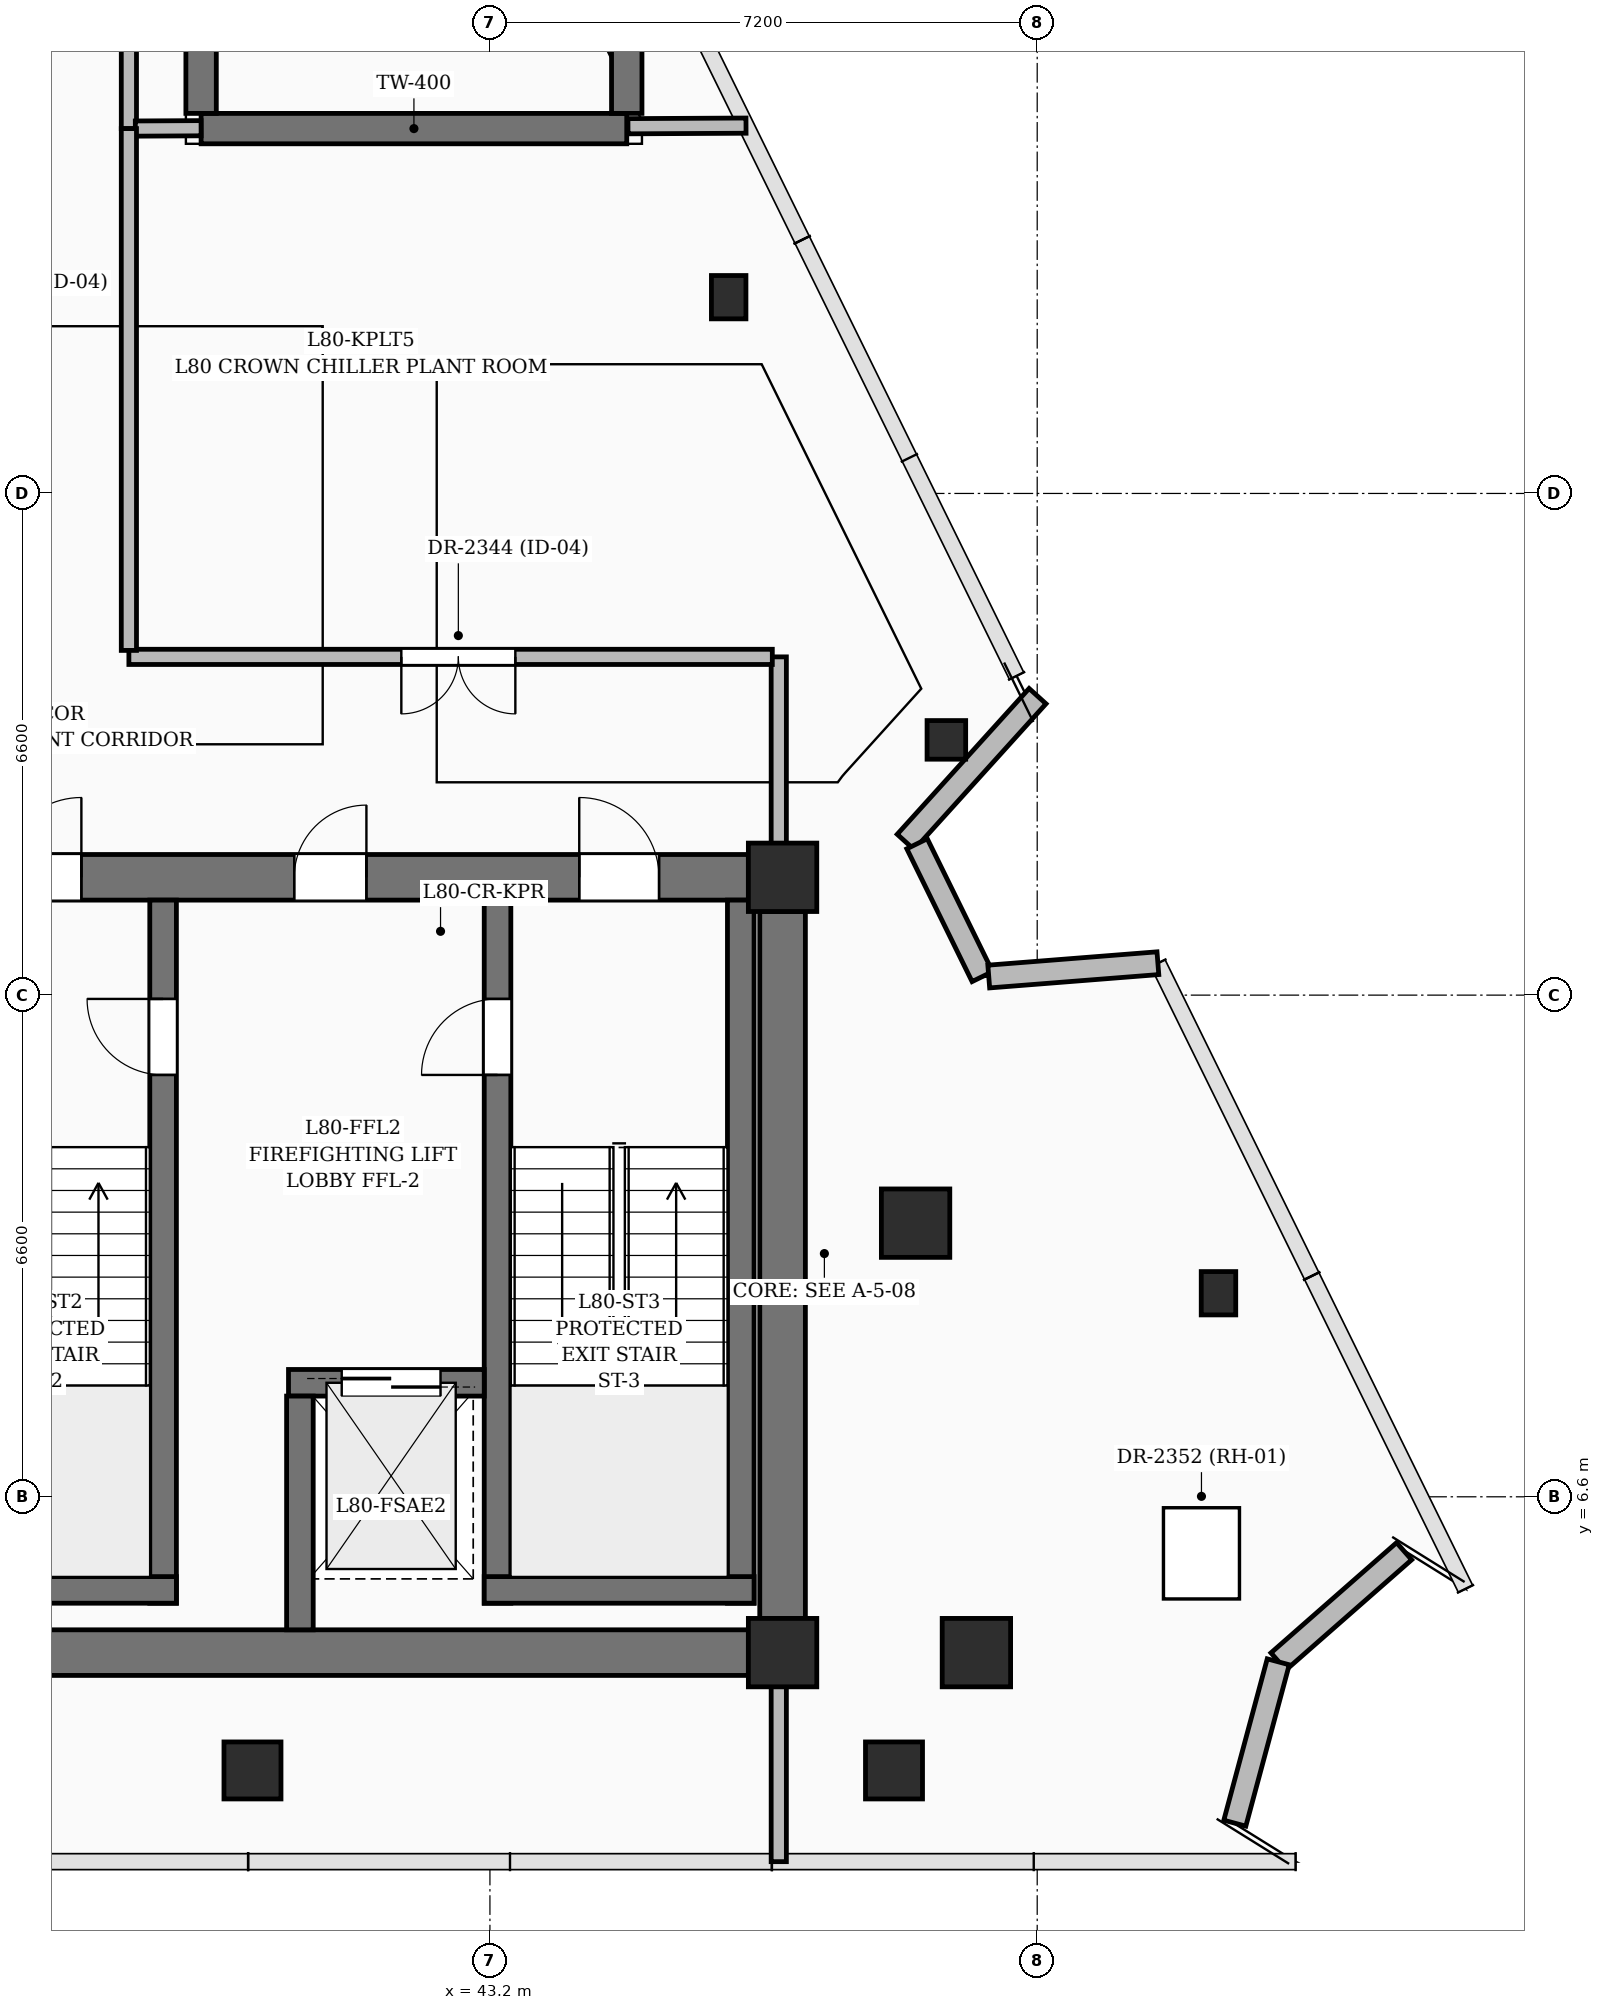
"""IFC4 building model, lengths in metres.
Left out: names, types, materials, properties, quantities, classifications, styles, units other than length and angle.
Written with IfcOpenShell. Run it as: python <this file> out.ifc"""

import sys

from ifc_helpers import new_model, si_unit, direction, frame, frame_2d, origin, origin_2d, place, context, subcontext, project, spatial, rectangle, hollow_circle, i_section, extrude, element, fill, save


model = new_model("IFC4")
c1 = context("Model", 3, precision=1e-05, world=origin(), true_north=direction((0.0, 1.0)))
c2 = subcontext(c1, "Body", "Model", "MODEL_VIEW")
j1 = project(units=[si_unit("LENGTHUNIT", "METRE"), si_unit("PLANEANGLEUNIT", "RADIAN")], contexts=[c1])
p1 = place(None, origin())
s1 = spatial("IfcSite", under=j1, at=p1, CompositionType="ELEMENT")
p2 = place(p1, origin())
s2 = spatial("IfcBuilding", under=s1, at=p2, CompositionType="ELEMENT")
p3 = place(p2, frame((0.0, 0.0, 310.5)))
s3 = spatial("IfcBuildingStorey", under=s2, at=p3, CompositionType="ELEMENT", Elevation=310.5)
for number, where, z_axis, x_axis in (
    (1, (47.05, 4.55, 0.0), (0.0, 0.0, 1.0), (1.0, 0.0, 0.0)),
    (2, (47.05, 14.75, 0.0), (0.0, 0.0, 1.0), (1.0, 0.0, 0.0)),
    (3, (49.6, 4.55, 0.0), (0.0, 0.0, 1.0), (1.0, 0.0, 0.0)),
    (4, (48.8, 10.2, 0.0), (0.0, 0.0, 1.0), (1.0, 0.0, 0.0)),
):
    element("IfcColumn", number, at=place(p3, frame(where, z_axis=z_axis, x_axis=x_axis)), inside=s3, PredefinedType="COLUMN", context=c2, shape_type="SweptSolid", body=[
        extrude(rectangle(XDim=0.9, YDim=0.9, at=origin_2d()), origin(), (0.0, 0.0, 1.0), 4.0),
    ])
p4 = place(p3, frame((35.6, 4.55, 0.0), z_axis=(0.0, 0.0, 1.0), x_axis=(1.0, 0.0, 0.0)))
e5 = element("IfcWall", 5, at=p4, inside=s3, PredefinedType="SHEAR", context=c2, shape_type="SweptSolid", body=[
    extrude(rectangle(XDim=11.0, YDim=0.6, at=frame_2d((5.5, 0.0))), origin(), (0.0, 0.0, 1.0), 4.0),
])
p5 = place(p3, frame((35.6, 14.75, 0.0), z_axis=(0.0, 0.0, 1.0), x_axis=(1.0, 0.0, 0.0)))
e6 = element("IfcWall", 6, at=p5, inside=s3, PredefinedType="SHEAR", context=c2, shape_type="SweptSolid", body=[
    extrude(rectangle(XDim=11.0, YDim=0.6, at=frame_2d((5.5, 0.0))), origin(), (0.0, 0.0, 1.0), 4.0),
])
p6 = place(p5, frame((1.175, 0.0, 0.0)))
e7 = element("IfcOpeningElement", 7, at=p6, cuts=e6, PredefinedType="OPENING", context=c2, shape_type="SweptSolid", body=[
    extrude(rectangle(XDim=1.05, YDim=2.15, at=frame_2d((0.525, 1.075))), frame((0.0, 0.31, 0.0), z_axis=(0.0, -1.0, 0.0), x_axis=(1.0, 0.0, 0.0)), (0.0, 0.0, 1.0), 0.62),
])
p7 = place(p5, frame((8.775, 0.0, 0.0)))
e8 = element("IfcOpeningElement", 8, at=p7, cuts=e6, PredefinedType="OPENING", context=c2, shape_type="SweptSolid", body=[
    extrude(rectangle(XDim=1.05, YDim=2.15, at=frame_2d((0.525, 1.075))), frame((0.0, 0.31, 0.0), z_axis=(0.0, -1.0, 0.0), x_axis=(1.0, 0.0, 0.0)), (0.0, 0.0, 1.0), 0.62),
])
p8 = place(p5, frame((5.025, 0.0, 0.0)))
e9 = element("IfcOpeningElement", 9, at=p8, cuts=e6, PredefinedType="OPENING", context=c2, shape_type="SweptSolid", body=[
    extrude(rectangle(XDim=0.95, YDim=2.15, at=frame_2d((0.475, 1.075))), frame((0.0, 0.31, 0.0), z_axis=(0.0, -1.0, 0.0), x_axis=(1.0, 0.0, 0.0)), (0.0, 0.0, 1.0), 0.62),
])
p9 = place(p3, frame((47.05, 5.0, 0.0), z_axis=(0.0, 0.0, 1.0), x_axis=(0.0, 1.0, 0.0)))
e10 = element("IfcWall", 10, at=p9, inside=s3, PredefinedType="SHEAR", context=c2, shape_type="SweptSolid", body=[
    extrude(rectangle(XDim=9.3, YDim=0.6, at=frame_2d((4.65, 0.0))), origin(), (0.0, 0.0, 1.0), 4.0),
])
p10 = place(p3, frame((38.9, 5.2, 0.0), z_axis=(0.0, 0.0, 1.0), x_axis=(0.0, 1.0, 0.0)))
e11 = element("IfcWall", 11, at=p10, inside=s3, PredefinedType="SOLIDWALL", context=c2, shape_type="SweptSolid", body=[
    extrude(rectangle(XDim=9.25, YDim=0.35, at=frame_2d((4.625, 0.0))), origin(), (0.0, 0.0, 1.0), 4.0),
])
p11 = place(p10, frame((6.95, 0.0, 0.0)))
e12 = element("IfcOpeningElement", 12, at=p11, cuts=e11, PredefinedType="OPENING", context=c2, shape_type="SweptSolid", body=[
    extrude(rectangle(XDim=1.0, YDim=2.15, at=frame_2d((0.5, 1.075))), frame((0.0, 0.185, 0.0), z_axis=(0.0, -1.0, 0.0), x_axis=(1.0, 0.0, 0.0)), (0.0, 0.0, 1.0), 0.37),
])
p12 = place(p3, frame((35.525, 5.375, 0.0), z_axis=(0.0, 0.0, 1.0), x_axis=(1.0, 0.0, 0.0)))
e13 = element("IfcWall", 13, at=p12, inside=s3, PredefinedType="SOLIDWALL", context=c2, shape_type="SweptSolid", body=[
    extrude(rectangle(XDim=3.55, YDim=0.35, at=frame_2d((1.775, 0.0))), origin(), (0.0, 0.0, 1.0), 4.0),
])
p13 = place(p3, frame((43.3, 5.2, 0.0), z_axis=(0.0, 0.0, 1.0), x_axis=(0.0, 1.0, 0.0)))
e14 = element("IfcWall", 14, at=p13, inside=s3, PredefinedType="SOLIDWALL", context=c2, shape_type="SweptSolid", body=[
    extrude(rectangle(XDim=9.25, YDim=0.35, at=frame_2d((4.625, 0.0))), origin(), (0.0, 0.0, 1.0), 4.0),
])
p14 = place(p13, frame((6.95, 0.0, 0.0)))
e15 = element("IfcOpeningElement", 15, at=p14, cuts=e14, PredefinedType="OPENING", context=c2, shape_type="SweptSolid", body=[
    extrude(rectangle(XDim=1.0, YDim=2.15, at=frame_2d((0.5, 1.075))), frame((0.0, 0.185, 0.0), z_axis=(0.0, -1.0, 0.0), x_axis=(1.0, 0.0, 0.0)), (0.0, 0.0, 1.0), 0.37),
])
p15 = place(p3, frame((46.5, 5.2, 0.0), z_axis=(0.0, 0.0, 1.0), x_axis=(0.0, 1.0, 0.0)))
e16 = element("IfcWall", 16, at=p15, inside=s3, PredefinedType="SOLIDWALL", context=c2, shape_type="SweptSolid", body=[
    extrude(rectangle(XDim=9.25, YDim=0.35, at=frame_2d((4.625, 0.0))), origin(), (0.0, 0.0, 1.0), 4.0),
])
p16 = place(p3, frame((43.125, 5.375, 0.0), z_axis=(0.0, 0.0, 1.0), x_axis=(1.0, 0.0, 0.0)))
e17 = element("IfcWall", 17, at=p16, inside=s3, PredefinedType="SOLIDWALL", context=c2, shape_type="SweptSolid", body=[
    extrude(rectangle(XDim=3.55, YDim=0.35, at=frame_2d((1.775, 0.0))), origin(), (0.0, 0.0, 1.0), 4.0),
])
p17 = place(p3, frame((40.55, 8.1, 0.0), z_axis=(0.0, 0.0, 1.0), x_axis=(1.0, 0.0, 0.0)))
e18 = element("IfcWall", 18, at=p17, inside=s3, PredefinedType="SOLIDWALL", context=c2, shape_type="SweptSolid", body=[
    extrude(rectangle(XDim=2.575, YDim=0.35, at=frame_2d((1.288, 0.0))), origin(), (0.0, 0.0, 1.0), 4.0),
])
p18 = place(p17, frame((0.7, 0.0, 0.0)))
e19 = element("IfcOpeningElement", 19, at=p18, cuts=e18, PredefinedType="OPENING", context=c2, shape_type="SweptSolid", body=[
    extrude(rectangle(XDim=1.3, YDim=2.25, at=frame_2d((0.65, 1.125))), frame((0.0, 0.185, 0.0), z_axis=(0.0, -1.0, 0.0), x_axis=(1.0, 0.0, 0.0)), (0.0, 0.0, 1.0), 0.37),
])
p19 = place(p3, frame((40.7, 4.85, 0.0), z_axis=(0.0, 0.0, 1.0), x_axis=(0.0, 1.0, 0.0)))
e20 = element("IfcWall", 20, at=p19, inside=s3, PredefinedType="SOLIDWALL", context=c2, shape_type="SweptSolid", body=[
    extrude(rectangle(XDim=3.075, YDim=0.35, at=frame_2d((1.538, 0.0))), origin(), (0.0, 0.0, 1.0), 4.0),
])
for number, where, z_axis, x_axis in (
    (21, (40.076, 3.0, 0.0), (0.0, 0.0, 1.0), (1.0, 0.0, 0.0)),
    (22, (48.516, 3.0, 0.0), (0.0, 0.0, 1.0), (1.0, 0.0, 0.0)),
):
    element("IfcColumn", number, at=place(p3, frame(where, z_axis=z_axis, x_axis=x_axis)), inside=s3, PredefinedType="COLUMN", context=c2, shape_type="SweptSolid", body=[
        extrude(rectangle(XDim=0.75, YDim=0.75, at=origin_2d()), origin(), (0.0, 0.0, 1.0), 4.0),
    ])
p20 = place(p3, frame((52.785, 9.278, 0.0), z_axis=(0.0, 0.0, 1.0), x_axis=(1.0, 0.0, 0.0)))
e23 = element("IfcColumn", 23, at=p20, inside=s3, PredefinedType="COLUMN", context=c2, shape_type="SweptSolid", body=[
    extrude(i_section(OverallWidth=0.454, OverallDepth=0.57, WebThickness=0.078, FlangeThickness=0.094, FilletRadius=0.02, at=origin_2d()), origin(), (0.0, 0.0, 1.0), 4.0),
])
p21 = place(p3, frame((49.205, 16.558, 0.0), z_axis=(0.0, 0.0, 1.0), x_axis=(1.0, 0.0, 0.0)))
e24 = element("IfcColumn", 24, at=p21, inside=s3, PredefinedType="COLUMN", context=c2, shape_type="SweptSolid", body=[
    extrude(hollow_circle(Radius=0.254, WallThickness=0.016, at=origin_2d()), origin(), (0.0, 0.0, 1.0), 4.0),
])
p22 = place(p3, frame((46.341, 22.382, 0.0), z_axis=(0.0, 0.0, 1.0), x_axis=(1.0, 0.0, 0.0)))
e25 = element("IfcColumn", 25, at=p22, inside=s3, PredefinedType="COLUMN", context=c2, shape_type="SweptSolid", body=[
    extrude(i_section(OverallWidth=0.454, OverallDepth=0.57, WebThickness=0.078, FlangeThickness=0.094, FilletRadius=0.02, at=origin_2d()), origin(), (0.0, 0.0, 1.0), 4.0),
])
p23 = place(p3, frame((39.4, 24.6, 0.15), z_axis=(0.0, 0.0, 1.0), x_axis=(1.0, 0.0, 0.0)))
e26 = element("IfcWall", 26, at=p23, inside=s3, PredefinedType="SHEAR", context=c2, shape_type="SweptSolid", body=[
    extrude(rectangle(XDim=5.6, YDim=0.4, at=frame_2d((2.8, 0.0))), origin(), (0.0, 0.0, 1.0), 2.2),
])
for number, where, z_axis, x_axis in (
    (27, (39.4, 24.8, 0.15), (0.0, 0.0, 1.0), (0.0, 1.0, 0.0)),
    (28, (45.0, 24.8, 0.15), (0.0, 0.0, 1.0), (0.0, 1.0, 0.0)),
):
    element("IfcWall", number, at=place(p3, frame(where, z_axis=z_axis, x_axis=x_axis)), inside=s3, PredefinedType="SHEAR", context=c2, shape_type="SweptSolid", body=[
        extrude(rectangle(XDim=2.8, YDim=0.4, at=frame_2d((1.4, 0.0))), origin(), (0.0, 0.0, 1.0), 2.2),
    ])
p24 = place(p3, frame((50.405, 17.134, 0.0), z_axis=(0.0, 0.0, 1.0), x_axis=(-0.670777387581, -0.741658746534, 0.0)))
e29 = element("IfcWall", 29, at=p24, inside=s3, PredefinedType="SOLIDWALL", context=c2, shape_type="SweptSolid", body=[
    extrude(rectangle(XDim=2.587, YDim=0.3, at=frame_2d((1.293, 0.0))), origin(), (0.0, 0.0, 1.0), 2.982),
])
p25 = place(p3, frame((48.819, 15.191, 0.0), z_axis=(0.0, 0.0, 1.0), x_axis=(0.441082896779, -0.897466366038, 0.0)))
e30 = element("IfcWall", 30, at=p25, inside=s3, PredefinedType="SOLIDWALL", context=c2, shape_type="SweptSolid", body=[
    extrude(rectangle(XDim=1.947, YDim=0.3, at=frame_2d((0.973, 0.0))), origin(), (0.0, 0.0, 1.0), 3.7),
])
p26 = place(p3, frame((49.763, 13.444, 0.0), z_axis=(0.0, 0.0, 1.0), x_axis=(0.996894082253, 0.078753976215, 0.0)))
e31 = element("IfcWall", 31, at=p26, inside=s3, PredefinedType="SOLIDWALL", context=c2, shape_type="SweptSolid", body=[
    extrude(rectangle(XDim=2.232, YDim=0.3, at=frame_2d((1.116, 0.0))), origin(), (0.0, 0.0, 1.0), 2.982),
])
p27 = place(p3, frame((55.227, 5.884, 0.0), z_axis=(0.0, 0.0, 1.0), x_axis=(-0.751785184768, -0.659408095161, 0.0)))
e32 = element("IfcWall", 32, at=p27, inside=s3, PredefinedType="SOLIDWALL", context=c2, shape_type="SweptSolid", body=[
    extrude(rectangle(XDim=2.199, YDim=0.3, at=frame_2d((1.1, 0.0))), origin(), (0.0, 0.0, 1.0), 3.7),
])
p28 = place(p3, frame((53.571, 4.429, 0.0), z_axis=(0.0, 0.0, 1.0), x_axis=(-0.259846037112, -0.965650059285, 0.0)))
e33 = element("IfcWall", 33, at=p28, inside=s3, PredefinedType="SOLIDWALL", context=c2, shape_type="SweptSolid", body=[
    extrude(rectangle(XDim=2.198, YDim=0.3, at=frame_2d((1.099, 0.0))), origin(), (0.0, 0.0, 1.0), 3.7),
])
p29 = place(p3, frame((47.0, 1.8, 0.0), z_axis=(0.0, 0.0, 1.0), x_axis=(0.0, 1.0, 0.0)))
e34 = element("IfcWall", 34, at=p29, inside=s3, PredefinedType="PARTITIONING", context=c2, shape_type="SweptSolid", body=[
    extrude(rectangle(XDim=2.45, YDim=0.2, at=frame_2d((1.225, 0.0))), origin(), (0.0, 0.0, 1.0), 2.977),
])
p30 = place(p3, frame((38.45, 27.715, 0.0), z_axis=(0.0, 0.0, 1.0), x_axis=(0.0, -1.0, 0.0)))
e35 = element("IfcWall", 35, at=p30, inside=s3, PredefinedType="PARTITIONING", context=c2, shape_type="SweptSolid", body=[
    extrude(rectangle(XDim=3.115, YDim=0.2, at=frame_2d((1.558, 0.0))), origin(), (0.0, 0.0, 1.0), 3.21),
])
p31 = place(p3, frame((38.535, 24.6, 0.0), z_axis=(0.0, 0.0, 1.0), x_axis=(0.999985621104, 0.005362609879, 0.0)))
e36 = element("IfcWall", 36, at=p31, inside=s3, PredefinedType="PARTITIONING", context=c2, shape_type="SweptSolid", body=[
    extrude(rectangle(XDim=0.865, YDim=0.2, at=frame_2d((0.433, 0.0))), origin(), (0.0, 0.0, 1.0), 2.977),
])
p32 = place(p3, frame((47.0, 15.05, 0.0), z_axis=(0.0, 0.0, 1.0), x_axis=(0.0, 1.0, 0.0)))
e37 = element("IfcWall", 37, at=p32, inside=s3, PredefinedType="PARTITIONING", context=c2, shape_type="SweptSolid", body=[
    extrude(rectangle(XDim=2.6, YDim=0.2, at=frame_2d((1.3, 0.0))), origin(), (0.0, 0.0, 1.0), 3.035),
])
p33 = place(p3, frame((46.915, 17.65, 0.0), z_axis=(0.0, 0.0, 1.0), x_axis=(-1.0, 0.0, 0.0)))
e38 = element("IfcWall", 38, at=p33, inside=s3, PredefinedType="PARTITIONING", context=c2, shape_type="SweptSolid", body=[
    extrude(rectangle(XDim=8.465, YDim=0.2, at=frame_2d((4.232, 0.0))), origin(), (0.0, 0.0, 1.0), 3.035),
])
p34 = place(p33, frame((3.381, 0.0, 0.0)))
e39 = element("IfcOpeningElement", 39, at=p34, cuts=e38, PredefinedType="OPENING", context=c2, shape_type="SweptSolid", body=[
    extrude(rectangle(XDim=1.5, YDim=2.2, at=frame_2d((0.75, 1.1))), frame((0.0, 0.11, 0.0), z_axis=(0.0, -1.0, 0.0), x_axis=(1.0, 0.0, 0.0)), (0.0, 0.0, 1.0), 0.22),
])
p35 = place(p3, frame((38.45, 17.735, 0.0), z_axis=(0.0, 0.0, 1.0), x_axis=(0.0, 1.0, 0.0)))
e40 = element("IfcWall", 40, at=p35, inside=s3, PredefinedType="PARTITIONING", context=c2, shape_type="SweptSolid", body=[
    extrude(rectangle(XDim=6.865, YDim=0.2, at=frame_2d((3.433, 0.0))), origin(), (0.0, 0.0, 1.0), 3.035),
])
p36 = place(p3, frame((45.016, 24.631, 0.0), z_axis=(0.0, 0.0, 1.0), x_axis=(0.999987346493, 0.005030591902, 0.0)))
e41 = element("IfcWall", 41, at=p36, inside=s3, PredefinedType="PARTITIONING", context=c2, shape_type="SweptSolid", body=[
    extrude(rectangle(XDim=1.553, YDim=0.2, at=frame_2d((0.776, 0.0))), origin(), (0.0, 0.0, 1.0), 2.977),
])
p37 = place(p3, frame((0.0, 0.0, -0.3)))
p38 = place(p37, frame((52.561, 5.856, 0.0)))
p39 = place(p38, frame((0.0, 0.0, 0.25)))
e42 = element("IfcDoor", 42, at=p39, inside=s3, OperationType="SINGLE_SWING_LEFT", PredefinedType="TRAPDOOR", context=c2, shape_type="SweptSolid", body=[
    extrude(rectangle(XDim=1.0, YDim=1.2, at=origin_2d()), origin(), (0.0, 0.0, 1.0), 0.05),
])
p40 = place(p6, origin())
e43 = element("IfcDoor", 43, at=p40, inside=s3, OperationType="SINGLE_SWING_RIGHT", PredefinedType="DOOR", context=c2, shape_type="SweptSolid", body=[
    extrude(rectangle(XDim=1.05, YDim=2.15, at=frame_2d((0.525, 1.075))), frame((0.0, 0.025, 0.0), z_axis=(0.0, -1.0, 0.0), x_axis=(1.0, 0.0, 0.0)), (0.0, 0.0, 1.0), 0.05),
])
fill(e7, e43)
p41 = place(p7, origin())
e44 = element("IfcDoor", 44, at=p41, inside=s3, OperationType="SINGLE_SWING_LEFT", PredefinedType="DOOR", context=c2, shape_type="SweptSolid", body=[
    extrude(rectangle(XDim=1.05, YDim=2.15, at=frame_2d((0.525, 1.075))), frame((0.0, 0.025, 0.0), z_axis=(0.0, -1.0, 0.0), x_axis=(1.0, 0.0, 0.0)), (0.0, 0.0, 1.0), 0.05),
])
fill(e8, e44)
p42 = place(p11, origin())
e45 = element("IfcDoor", 45, at=p42, inside=s3, OperationType="SINGLE_SWING_RIGHT", PredefinedType="DOOR", context=c2, shape_type="SweptSolid", body=[
    extrude(rectangle(XDim=1.0, YDim=2.15, at=frame_2d((0.5, 1.075))), frame((0.0, 0.025, 0.0), z_axis=(0.0, -1.0, 0.0), x_axis=(1.0, 0.0, 0.0)), (0.0, 0.0, 1.0), 0.05),
])
fill(e12, e45)
p43 = place(p14, origin())
e46 = element("IfcDoor", 46, at=p43, inside=s3, OperationType="SINGLE_SWING_LEFT", PredefinedType="DOOR", context=c2, shape_type="SweptSolid", body=[
    extrude(rectangle(XDim=1.0, YDim=2.15, at=frame_2d((0.5, 1.075))), frame((0.0, 0.025, 0.0), z_axis=(0.0, -1.0, 0.0), x_axis=(1.0, 0.0, 0.0)), (0.0, 0.0, 1.0), 0.05),
])
fill(e15, e46)
p44 = place(p18, origin())
e47 = element("IfcDoor", 47, at=p44, inside=s3, OperationType="DOUBLE_DOOR_SLIDING", PredefinedType="DOOR", context=c2, shape_type="SweptSolid", body=[
    extrude(rectangle(XDim=1.3, YDim=2.25, at=frame_2d((0.65, 1.125))), frame((0.0, 0.025, 0.0), z_axis=(0.0, -1.0, 0.0), x_axis=(1.0, 0.0, 0.0)), (0.0, 0.0, 1.0), 0.05),
])
fill(e19, e47)
p45 = place(p8, origin())
e48 = element("IfcDoor", 48, at=p45, inside=s3, OperationType="SINGLE_SWING_RIGHT", PredefinedType="DOOR", context=c2, shape_type="SweptSolid", body=[
    extrude(rectangle(XDim=0.95, YDim=2.15, at=frame_2d((0.475, 1.075))), frame((0.0, 0.025, 0.0), z_axis=(0.0, -1.0, 0.0), x_axis=(1.0, 0.0, 0.0)), (0.0, 0.0, 1.0), 0.05),
])
fill(e9, e48)
p46 = place(p34, origin())
e49 = element("IfcDoor", 49, at=p46, inside=s3, OperationType="DOUBLE_DOOR_SINGLE_SWING", PredefinedType="DOOR", context=c2, shape_type="SweptSolid", body=[
    extrude(rectangle(XDim=1.5, YDim=2.2, at=frame_2d((0.75, 1.1))), frame((0.0, 0.025, 0.0), z_axis=(0.0, -1.0, 0.0), x_axis=(1.0, 0.0, 0.0)), (0.0, 0.0, 1.0), 0.05),
])
fill(e39, e49)
save(model, sys.argv[1])
